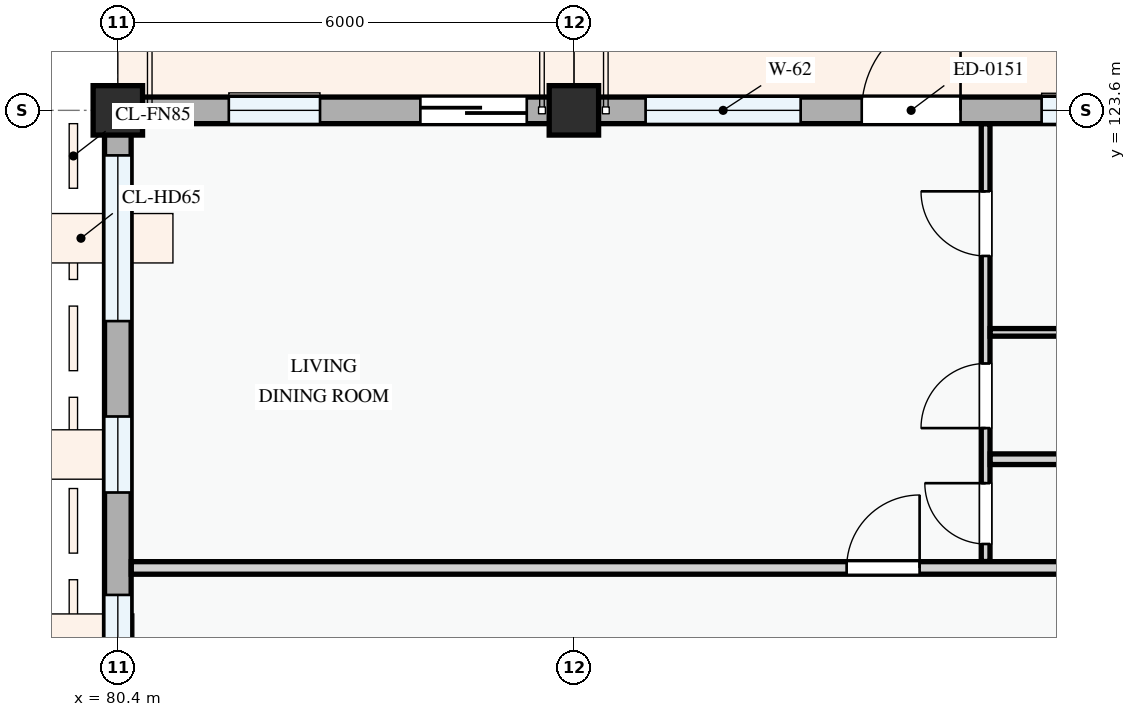
"""IFC4 building model, lengths in metres.
Left out: names, types, materials, properties, quantities, classifications, styles, units other than length and angle.
Written with IfcOpenShell. Run it as: python <this file> out.ifc"""

import sys

from ifc_helpers import new_model, si_unit, direction, frame, frame_2d, origin, origin_2d, place, context, subcontext, project, spatial, rectangle, extrude, element, fill, save


model = new_model("IFC4")
c1 = context("Model", 3, precision=1e-05, world=origin(), true_north=direction((0.0, 1.0)))
c2 = subcontext(c1, "Body", "Model", "MODEL_VIEW")
j1 = project(units=[si_unit("LENGTHUNIT", "METRE"), si_unit("PLANEANGLEUNIT", "RADIAN")], contexts=[c1])
p1 = place(None, origin())
s1 = spatial("IfcSite", under=j1, at=p1, CompositionType="ELEMENT")
p2 = place(p1, origin())
s2 = spatial("IfcBuilding", under=s1, at=p2, CompositionType="ELEMENT")
p3 = place(p2, frame((0.0, 0.0, 11.4)))
s3 = spatial("IfcBuildingStorey", under=s2, at=p3, CompositionType="ELEMENT", Elevation=11.4)
for number, where, z_axis, x_axis in (
    (1, (80.4, 123.6, 0.0), (0.0, 0.0, 1.0), (1.0, 0.0, 0.0)),
    (2, (86.4, 123.6, 0.0), (0.0, 0.0, 1.0), (1.0, 0.0, 0.0)),
):
    element("IfcColumn", number, at=place(p3, frame(where, z_axis=z_axis, x_axis=x_axis)), inside=s3, PredefinedType="COLUMN", context=c2, shape_type="SweptSolid", body=[
        extrude(rectangle(XDim=0.65, YDim=0.65, at=origin_2d()), origin(), (0.0, 0.0, 1.0), 3.3),
    ])
p4 = place(p3, frame((94.8, 123.6, 0.0), z_axis=(0.0, 0.0, 1.0), x_axis=(-1.0, 0.0, 0.0)))
e3 = element("IfcWall", 3, at=p4, inside=s3, PredefinedType="STANDARD", context=c2, shape_type="SweptSolid", body=[
    extrude(rectangle(XDim=8.4, YDim=0.35, at=frame_2d((4.2, 0.0))), origin(), (0.0, 0.0, 1.0), 2.375),
])
p5 = place(p4, frame((3.313, 0.0, 0.0)))
e4 = element("IfcOpeningElement", 4, at=p5, cuts=e3, PredefinedType="OPENING", context=c2, shape_type="SweptSolid", body=[
    extrude(rectangle(XDim=1.3, YDim=2.15, at=frame_2d((0.65, 1.075))), frame((0.0, 0.185, 0.0), z_axis=(0.0, -1.0, 0.0), x_axis=(1.0, 0.0, 0.0)), (0.0, 0.0, 1.0), 0.37),
])
p6 = place(p4, frame((0.927, 0.0, 0.78)))
e5 = element("IfcOpeningElement", 5, at=p6, cuts=e3, PredefinedType="OPENING", context=c2, shape_type="SweptSolid", body=[
    extrude(rectangle(XDim=1.32, YDim=1.35, at=frame_2d((0.66, 0.675))), frame((0.0, 0.185, 0.0), z_axis=(0.0, -1.0, 0.0), x_axis=(1.0, 0.0, 0.0)), (0.0, 0.0, 1.0), 0.37),
])
p7 = place(p4, frame((5.417, 0.0, 0.78)))
e6 = element("IfcOpeningElement", 6, at=p7, cuts=e3, PredefinedType="OPENING", context=c2, shape_type="SweptSolid", body=[
    extrude(rectangle(XDim=2.04, YDim=1.46, at=frame_2d((1.02, 0.73))), frame((0.0, 0.185, 0.0), z_axis=(0.0, -1.0, 0.0), x_axis=(1.0, 0.0, 0.0)), (0.0, 0.0, 1.0), 0.37),
])
p8 = place(p3, frame((86.4, 123.6, 0.0), z_axis=(0.0, 0.0, 1.0), x_axis=(-1.0, 0.0, 0.0)))
e7 = element("IfcWall", 7, at=p8, inside=s3, PredefinedType="STANDARD", context=c2, shape_type="SweptSolid", body=[
    extrude(rectangle(XDim=6.0, YDim=0.35, at=frame_2d((3.0, 0.0))), origin(), (0.0, 0.0, 1.0), 2.475),
])
p9 = place(p8, frame((0.62, 0.0, 0.0)))
e8 = element("IfcOpeningElement", 8, at=p9, cuts=e7, PredefinedType="OPENING", context=c2, shape_type="SweptSolid", body=[
    extrude(rectangle(XDim=1.4, YDim=2.2, at=frame_2d((0.7, 1.1))), frame((0.0, 0.185, 0.0), z_axis=(0.0, -1.0, 0.0), x_axis=(1.0, 0.0, 0.0)), (0.0, 0.0, 1.0), 0.37),
])
p10 = place(p8, frame((3.34, 0.0, 0.78)))
e9 = element("IfcOpeningElement", 9, at=p10, cuts=e7, PredefinedType="OPENING", context=c2, shape_type="SweptSolid", body=[
    extrude(rectangle(XDim=1.2, YDim=1.5, at=frame_2d((0.6, 0.75))), frame((0.0, 0.185, 0.0), z_axis=(0.0, -1.0, 0.0), x_axis=(1.0, 0.0, 0.0)), (0.0, 0.0, 1.0), 0.37),
])
p11 = place(p3, frame((80.4, 123.6, 0.0), z_axis=(0.0, 0.0, 1.0), x_axis=(0.0, -1.0, 0.0)))
e10 = element("IfcWall", 10, at=p11, inside=s3, PredefinedType="STANDARD", context=c2, shape_type="SweptSolid", body=[
    extrude(rectangle(XDim=8.4, YDim=0.35, at=frame_2d((4.2, 0.0))), origin(), (0.0, 0.0, 1.0), 2.425),
])
p12 = place(p11, frame((0.593, 0.0, 0.78)))
e11 = element("IfcOpeningElement", 11, at=p12, cuts=e10, PredefinedType="OPENING", context=c2, shape_type="SweptSolid", body=[
    extrude(rectangle(XDim=2.18, YDim=1.48, at=frame_2d((1.09, 0.74))), frame((0.0, 0.185, 0.0), z_axis=(0.0, -1.0, 0.0), x_axis=(1.0, 0.0, 0.0)), (0.0, 0.0, 1.0), 0.37),
])
p13 = place(p11, frame((4.028, 0.0, 0.78)))
e12 = element("IfcOpeningElement", 12, at=p13, cuts=e10, PredefinedType="OPENING", context=c2, shape_type="SweptSolid", body=[
    extrude(rectangle(XDim=1.0, YDim=1.25, at=frame_2d((0.5, 0.625))), frame((0.0, 0.185, 0.0), z_axis=(0.0, -1.0, 0.0), x_axis=(1.0, 0.0, 0.0)), (0.0, 0.0, 1.0), 0.37),
])
p14 = place(p11, frame((6.375, 0.0, 0.78)))
e13 = element("IfcOpeningElement", 13, at=p14, cuts=e10, PredefinedType="OPENING", context=c2, shape_type="SweptSolid", body=[
    extrude(rectangle(XDim=1.15, YDim=1.25, at=frame_2d((0.575, 0.625))), frame((0.0, 0.185, 0.0), z_axis=(0.0, -1.0, 0.0), x_axis=(1.0, 0.0, 0.0)), (0.0, 0.0, 1.0), 0.37),
])
p15 = place(p3, frame((91.817, 117.665, 0.0), z_axis=(0.0, 0.0, 1.0), x_axis=(0.0, 1.0, 0.0)))
e14 = element("IfcWall", 14, at=p15, inside=s3, PredefinedType="PARTITIONING", context=c2, shape_type="SweptSolid", body=[
    extrude(rectangle(XDim=5.759, YDim=0.115, at=frame_2d((2.879, 0.0))), origin(), (0.0, 0.0, 1.0), 3.0),
])
p16 = place(p15, frame((0.231, 0.0, 0.0)))
e15 = element("IfcOpeningElement", 15, at=p16, cuts=e14, PredefinedType="OPENING", context=c2, shape_type="SweptSolid", body=[
    extrude(rectangle(XDim=0.8, YDim=2.1, at=frame_2d((0.4, 1.05))), frame((0.0, 0.067, 0.0), z_axis=(0.0, -1.0, 0.0), x_axis=(1.0, 0.0, 0.0)), (0.0, 0.0, 1.0), 0.135),
])
p17 = place(p15, frame((1.755, 0.0, 0.0)))
e16 = element("IfcOpeningElement", 16, at=p17, cuts=e14, PredefinedType="OPENING", context=c2, shape_type="SweptSolid", body=[
    extrude(rectangle(XDim=0.85, YDim=2.1, at=frame_2d((0.425, 1.05))), frame((0.0, 0.067, 0.0), z_axis=(0.0, -1.0, 0.0), x_axis=(1.0, 0.0, 0.0)), (0.0, 0.0, 1.0), 0.135),
])
p18 = place(p15, frame((4.02, 0.0, 0.0)))
e17 = element("IfcOpeningElement", 17, at=p18, cuts=e14, PredefinedType="OPENING", context=c2, shape_type="SweptSolid", body=[
    extrude(rectangle(XDim=0.85, YDim=2.1, at=frame_2d((0.425, 1.05))), frame((0.0, 0.067, 0.0), z_axis=(0.0, -1.0, 0.0), x_axis=(1.0, 0.0, 0.0)), (0.0, 0.0, 1.0), 0.135),
])
p19 = place(p3, frame((91.876, 120.679, 0.0), z_axis=(0.0, 0.0, 1.0), x_axis=(1.0, 0.0, 0.0)))
e18 = element("IfcWall", 18, at=p19, inside=s3, PredefinedType="PARTITIONING", context=c2, shape_type="SweptSolid", body=[
    extrude(rectangle(XDim=12.142, YDim=0.1, at=frame_2d((6.071, 0.0))), origin(), (0.0, 0.0, 1.0), 3.0),
])
p20 = place(p3, frame((91.876, 119.01, 0.0), z_axis=(0.0, 0.0, 1.0), x_axis=(1.0, 0.0, 0.0)))
e19 = element("IfcWall", 19, at=p20, inside=s3, PredefinedType="PARTITIONING", context=c2, shape_type="SweptSolid", body=[
    extrude(rectangle(XDim=12.142, YDim=0.14, at=frame_2d((6.071, 0.0))), origin(), (0.0, 0.0, 1.0), 3.0),
])
p21 = place(p3, frame((80.577, 117.58, 0.0), z_axis=(0.0, 0.0, 1.0), x_axis=(1.0, 0.0, 0.0)))
e20 = element("IfcWall", 20, at=p21, inside=s3, PredefinedType="PARTITIONING", context=c2, shape_type="SweptSolid", body=[
    extrude(rectangle(XDim=71.963, YDim=0.165, at=frame_2d((35.981, 0.0))), origin(), (0.0, 0.0, 1.0), 3.0),
])
p22 = place(p21, frame((9.411, 0.0, 0.0)))
e21 = element("IfcOpeningElement", 21, at=p22, cuts=e20, PredefinedType="OPENING", context=c2, shape_type="SweptSolid", body=[
    extrude(rectangle(XDim=0.96, YDim=2.12, at=frame_2d((0.48, 1.06))), frame((0.0, 0.093, 0.0), z_axis=(0.0, -1.0, 0.0), x_axis=(1.0, 0.0, 0.0)), (0.0, 0.0, 1.0), 0.185),
])
p23 = place(p21, frame((23.793, 0.0, 0.0)))
e22 = element("IfcOpeningElement", 22, at=p23, cuts=e20, PredefinedType="OPENING", context=c2, shape_type="SweptSolid", body=[
    extrude(rectangle(XDim=0.92, YDim=2.1, at=frame_2d((0.46, 1.05))), frame((0.0, 0.093, 0.0), z_axis=(0.0, -1.0, 0.0), x_axis=(1.0, 0.0, 0.0)), (0.0, 0.0, 1.0), 0.185),
])
p24 = place(p21, frame((52.718, 0.0, 0.0)))
e23 = element("IfcOpeningElement", 23, at=p24, cuts=e20, PredefinedType="OPENING", context=c2, shape_type="SweptSolid", body=[
    extrude(rectangle(XDim=0.92, YDim=2.1, at=frame_2d((0.46, 1.05))), frame((0.0, 0.093, 0.0), z_axis=(0.0, -1.0, 0.0), x_axis=(1.0, 0.0, 0.0)), (0.0, 0.0, 1.0), 0.185),
])
p25 = place(p5, frame((1.3, 0.0, 0.0), z_axis=(0.0, 0.0, 1.0), x_axis=(-1.0, 0.0, 0.0)))
e24 = element("IfcDoor", 24, at=p25, inside=s3, OperationType="SINGLE_SWING_RIGHT", PredefinedType="DOOR", context=c2, shape_type="SweptSolid", body=[
    extrude(rectangle(XDim=1.3, YDim=2.15, at=frame_2d((0.65, 1.075))), frame((0.0, 0.025, 0.0), z_axis=(0.0, -1.0, 0.0), x_axis=(1.0, 0.0, 0.0)), (0.0, 0.0, 1.0), 0.05),
])
fill(e4, e24)
p26 = place(p6, origin())
e25 = element("IfcWindow", 25, at=p26, inside=s3, PartitioningType="SINGLE_PANEL", PredefinedType="WINDOW", context=c2, shape_type="SweptSolid", body=[
    extrude(rectangle(XDim=1.32, YDim=1.35, at=frame_2d((0.66, 0.675))), frame((0.0, 0.03, 0.0), z_axis=(0.0, -1.0, 0.0), x_axis=(1.0, 0.0, 0.0)), (0.0, 0.0, 1.0), 0.06),
])
fill(e5, e25)
p27 = place(p7, origin())
e26 = element("IfcWindow", 26, at=p27, inside=s3, PartitioningType="DOUBLE_PANEL_VERTICAL", PredefinedType="WINDOW", context=c2, shape_type="SweptSolid", body=[
    extrude(rectangle(XDim=2.04, YDim=1.46, at=frame_2d((1.02, 0.73))), frame((0.0, 0.03, 0.0), z_axis=(0.0, -1.0, 0.0), x_axis=(1.0, 0.0, 0.0)), (0.0, 0.0, 1.0), 0.06),
])
fill(e6, e26)
p28 = place(p9, frame((1.4, 0.0, 0.0), z_axis=(0.0, 0.0, 1.0), x_axis=(-1.0, 0.0, 0.0)))
e27 = element("IfcDoor", 27, at=p28, inside=s3, OperationType="SLIDING_TO_LEFT", PredefinedType="DOOR", context=c2, shape_type="SweptSolid", body=[
    extrude(rectangle(XDim=1.4, YDim=2.2, at=frame_2d((0.7, 1.1))), frame((0.0, 0.025, 0.0), z_axis=(0.0, -1.0, 0.0), x_axis=(1.0, 0.0, 0.0)), (0.0, 0.0, 1.0), 0.05),
])
fill(e8, e27)
p29 = place(p10, origin())
e28 = element("IfcWindow", 28, at=p29, inside=s3, PartitioningType="SINGLE_PANEL", PredefinedType="WINDOW", context=c2, shape_type="SweptSolid", body=[
    extrude(rectangle(XDim=1.2, YDim=1.5, at=frame_2d((0.6, 0.75))), frame((0.0, 0.03, 0.0), z_axis=(0.0, -1.0, 0.0), x_axis=(1.0, 0.0, 0.0)), (0.0, 0.0, 1.0), 0.06),
])
fill(e9, e28)
p30 = place(p12, origin())
e29 = element("IfcWindow", 29, at=p30, inside=s3, PartitioningType="DOUBLE_PANEL_VERTICAL", PredefinedType="WINDOW", context=c2, shape_type="SweptSolid", body=[
    extrude(rectangle(XDim=2.18, YDim=1.48, at=frame_2d((1.09, 0.74))), frame((0.0, 0.03, 0.0), z_axis=(0.0, -1.0, 0.0), x_axis=(1.0, 0.0, 0.0)), (0.0, 0.0, 1.0), 0.06),
])
fill(e11, e29)
p31 = place(p13, origin())
e30 = element("IfcWindow", 30, at=p31, inside=s3, PartitioningType="SINGLE_PANEL", PredefinedType="WINDOW", context=c2, shape_type="SweptSolid", body=[
    extrude(rectangle(XDim=1.0, YDim=1.25, at=frame_2d((0.5, 0.625))), frame((0.0, 0.03, 0.0), z_axis=(0.0, -1.0, 0.0), x_axis=(1.0, 0.0, 0.0)), (0.0, 0.0, 1.0), 0.06),
])
fill(e12, e30)
p32 = place(p14, origin())
e31 = element("IfcWindow", 31, at=p32, inside=s3, PartitioningType="SINGLE_PANEL", PredefinedType="WINDOW", context=c2, shape_type="SweptSolid", body=[
    extrude(rectangle(XDim=1.15, YDim=1.25, at=frame_2d((0.575, 0.625))), frame((0.0, 0.03, 0.0), z_axis=(0.0, -1.0, 0.0), x_axis=(1.0, 0.0, 0.0)), (0.0, 0.0, 1.0), 0.06),
])
fill(e13, e31)
p33 = place(p16, origin())
e32 = element("IfcDoor", 32, at=p33, inside=s3, OperationType="SINGLE_SWING_RIGHT", PredefinedType="DOOR", context=c2, shape_type="SweptSolid", body=[
    extrude(rectangle(XDim=0.8, YDim=2.1, at=frame_2d((0.4, 1.05))), frame((0.0, 0.025, 0.0), z_axis=(0.0, -1.0, 0.0), x_axis=(1.0, 0.0, 0.0)), (0.0, 0.0, 1.0), 0.05),
])
fill(e15, e32)
p34 = place(p17, origin())
e33 = element("IfcDoor", 33, at=p34, inside=s3, OperationType="SINGLE_SWING_LEFT", PredefinedType="DOOR", context=c2, shape_type="SweptSolid", body=[
    extrude(rectangle(XDim=0.85, YDim=2.1, at=frame_2d((0.425, 1.05))), frame((0.0, 0.025, 0.0), z_axis=(0.0, -1.0, 0.0), x_axis=(1.0, 0.0, 0.0)), (0.0, 0.0, 1.0), 0.05),
])
fill(e16, e33)
p35 = place(p18, origin())
e34 = element("IfcDoor", 34, at=p35, inside=s3, OperationType="SINGLE_SWING_RIGHT", PredefinedType="DOOR", context=c2, shape_type="SweptSolid", body=[
    extrude(rectangle(XDim=0.85, YDim=2.1, at=frame_2d((0.425, 1.05))), frame((0.0, 0.025, 0.0), z_axis=(0.0, -1.0, 0.0), x_axis=(1.0, 0.0, 0.0)), (0.0, 0.0, 1.0), 0.05),
])
fill(e17, e34)
p36 = place(p22, origin())
e35 = element("IfcDoor", 35, at=p36, inside=s3, OperationType="SINGLE_SWING_RIGHT", PredefinedType="DOOR", context=c2, shape_type="SweptSolid", body=[
    extrude(rectangle(XDim=0.96, YDim=2.12, at=frame_2d((0.48, 1.06))), frame((0.0, 0.025, 0.0), z_axis=(0.0, -1.0, 0.0), x_axis=(1.0, 0.0, 0.0)), (0.0, 0.0, 1.0), 0.05),
])
fill(e21, e35)
save(model, sys.argv[1])
